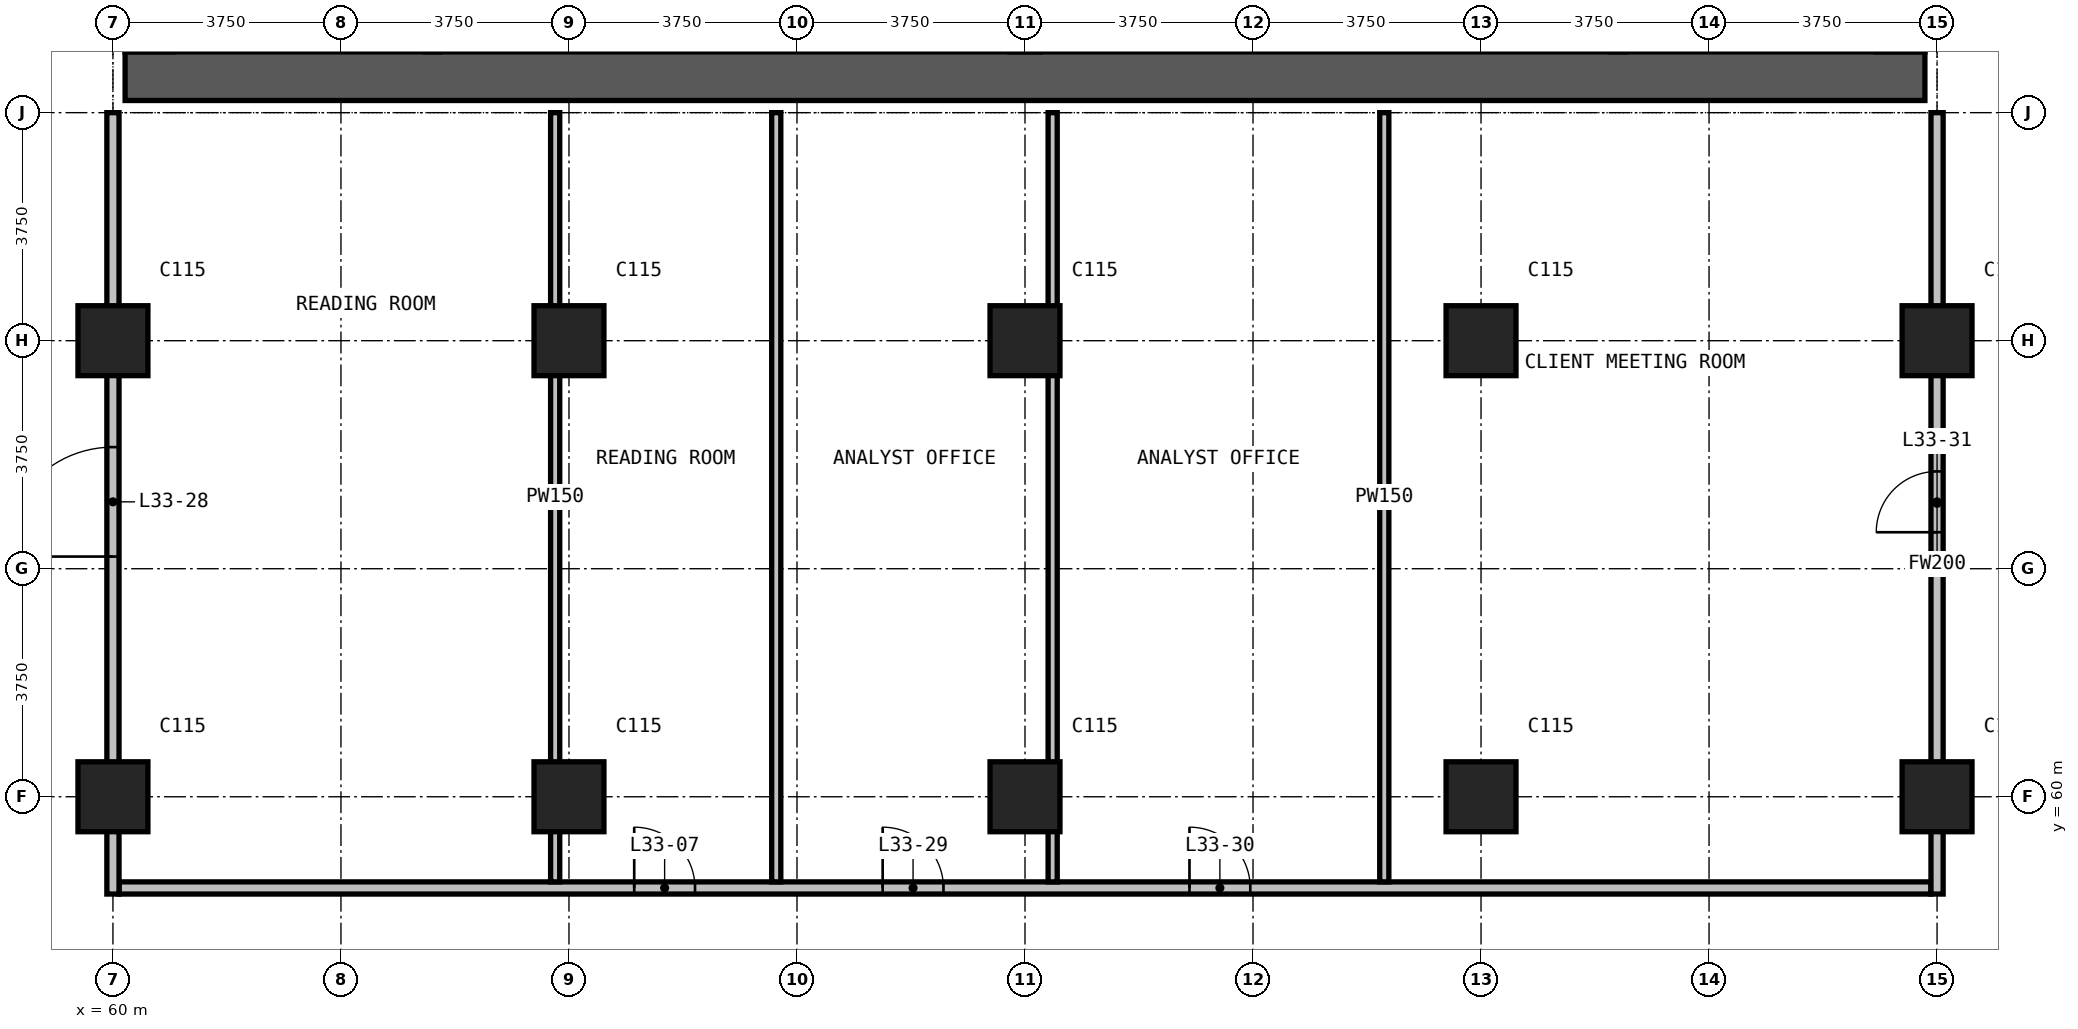
"""IFC4 building model, lengths in metres.
Left out: names, types, materials, properties, quantities, classifications, styles, units other than length and angle.
Written with IfcOpenShell. Run it as: python <this file> out.ifc"""

import sys

from ifc_helpers import new_model, si_unit, direction, frame, frame_2d, origin, origin_2d, place, context, subcontext, project, spatial, rectangle, extrude, element, fill, save


model = new_model("IFC4")
c1 = context("Model", 3, precision=1e-05, world=origin(), true_north=direction((0.0, 1.0)))
c2 = subcontext(c1, "Body", "Model", "MODEL_VIEW")
j1 = project(units=[si_unit("LENGTHUNIT", "METRE"), si_unit("PLANEANGLEUNIT", "RADIAN")], contexts=[c1])
p1 = place(None, origin())
s1 = spatial("IfcSite", under=j1, at=p1, CompositionType="ELEMENT")
p2 = place(p1, origin())
s2 = spatial("IfcBuilding", under=s1, at=p2, CompositionType="ELEMENT")
p3 = place(p2, frame((0.0, 0.0, 132.4)))
s3 = spatial("IfcBuildingStorey", under=s2, at=p3, CompositionType="ELEMENT", Elevation=132.4)
for number, where, z_axis, x_axis in (
    (1, (60.0, 60.0, 0.0), (0.0, 0.0, 1.0), (1.0, 0.0, 0.0)),
    (2, (60.0, 67.5, 0.0), (0.0, 0.0, 1.0), (1.0, 0.0, 0.0)),
    (3, (67.5, 60.0, 0.0), (0.0, 0.0, 1.0), (1.0, 0.0, 0.0)),
    (4, (67.5, 67.5, 0.0), (0.0, 0.0, 1.0), (1.0, 0.0, 0.0)),
    (5, (75.0, 60.0, 0.0), (0.0, 0.0, 1.0), (1.0, 0.0, 0.0)),
    (6, (75.0, 67.5, 0.0), (0.0, 0.0, 1.0), (1.0, 0.0, 0.0)),
    (7, (82.5, 60.0, 0.0), (0.0, 0.0, 1.0), (1.0, 0.0, 0.0)),
    (8, (82.5, 67.5, 0.0), (0.0, 0.0, 1.0), (1.0, 0.0, 0.0)),
    (9, (90.0, 60.0, 0.0), (0.0, 0.0, 1.0), (1.0, 0.0, 0.0)),
    (10, (90.0, 67.5, 0.0), (0.0, 0.0, 1.0), (1.0, 0.0, 0.0)),
):
    element("IfcColumn", number, at=place(p3, frame(where, z_axis=z_axis, x_axis=x_axis)), inside=s3, PredefinedType="COLUMN", context=c2, shape_type="SweptSolid", body=[
        extrude(rectangle(XDim=1.15, YDim=1.15, at=origin_2d()), origin(), (0.0, 0.0, 1.0), 3.6),
    ])
p4 = place(p3, frame((60.2, 71.85, 0.0), z_axis=(0.0, 0.0, 1.0), x_axis=(1.0, 0.0, 0.0)))
e11 = element("IfcWall", 11, at=p4, inside=s3, PredefinedType="SHEAR", context=c2, shape_type="SweptSolid", body=[
    extrude(rectangle(XDim=29.6, YDim=0.8, at=frame_2d((14.8, 0.0))), origin(), (0.0, 0.0, 1.0), 3.6),
])
p5 = place(p3, frame((60.1, 58.5, 0.0), z_axis=(0.0, 0.0, 1.0), x_axis=(1.0, 0.0, 0.0)))
e12 = element("IfcWall", 12, at=p5, inside=s3, PredefinedType="PARTITIONING", context=c2, shape_type="SweptSolid", body=[
    extrude(rectangle(XDim=29.8, YDim=0.2, at=frame_2d((14.9, 0.0))), origin(), (0.0, 0.0, 1.0), 3.3),
])
p6 = place(p5, frame((8.473, 0.0, 0.0)))
e13 = element("IfcOpeningElement", 13, at=p6, cuts=e12, PredefinedType="OPENING", context=c2, shape_type="SweptSolid", body=[
    extrude(rectangle(XDim=1.0, YDim=2.2, at=frame_2d((0.5, 1.1))), frame((0.0, 0.11, 0.0), z_axis=(0.0, -1.0, 0.0), x_axis=(1.0, 0.0, 0.0)), (0.0, 0.0, 1.0), 0.22),
])
p7 = place(p5, frame((12.559, 0.0, 0.0)))
e14 = element("IfcOpeningElement", 14, at=p7, cuts=e12, PredefinedType="OPENING", context=c2, shape_type="SweptSolid", body=[
    extrude(rectangle(XDim=1.0, YDim=2.2, at=frame_2d((0.5, 1.1))), frame((0.0, 0.11, 0.0), z_axis=(0.0, -1.0, 0.0), x_axis=(1.0, 0.0, 0.0)), (0.0, 0.0, 1.0), 0.22),
])
p8 = place(p5, frame((17.605, 0.0, 0.0)))
e15 = element("IfcOpeningElement", 15, at=p8, cuts=e12, PredefinedType="OPENING", context=c2, shape_type="SweptSolid", body=[
    extrude(rectangle(XDim=1.0, YDim=2.2, at=frame_2d((0.5, 1.1))), frame((0.0, 0.11, 0.0), z_axis=(0.0, -1.0, 0.0), x_axis=(1.0, 0.0, 0.0)), (0.0, 0.0, 1.0), 0.22),
])
p9 = place(p3, frame((60.0, 58.4, 0.0), z_axis=(0.0, 0.0, 1.0), x_axis=(0.0, 1.0, 0.0)))
e16 = element("IfcWall", 16, at=p9, inside=s3, PredefinedType="PARTITIONING", context=c2, shape_type="SweptSolid", body=[
    extrude(rectangle(XDim=12.85, YDim=0.2, at=frame_2d((6.425, 0.0))), origin(), (0.0, 0.0, 1.0), 3.3),
])
p10 = place(p9, frame((5.55, 0.0, 0.0)))
e17 = element("IfcOpeningElement", 17, at=p10, cuts=e16, PredefinedType="OPENING", context=c2, shape_type="SweptSolid", body=[
    extrude(rectangle(XDim=1.8, YDim=2.2, at=frame_2d((0.9, 1.1))), frame((0.0, 0.11, 0.0), z_axis=(0.0, -1.0, 0.0), x_axis=(1.0, 0.0, 0.0)), (0.0, 0.0, 1.0), 0.22),
])
p11 = place(p3, frame((90.0, 58.4, 0.0), z_axis=(0.0, 0.0, 1.0), x_axis=(0.0, 1.0, 0.0)))
e18 = element("IfcWall", 18, at=p11, inside=s3, PredefinedType="PARTITIONING", context=c2, shape_type="SweptSolid", body=[
    extrude(rectangle(XDim=12.85, YDim=0.2, at=frame_2d((6.425, 0.0))), origin(), (0.0, 0.0, 1.0), 3.3),
])
p12 = place(p11, frame((5.95, 0.0, 0.0)))
e19 = element("IfcOpeningElement", 19, at=p12, cuts=e18, PredefinedType="OPENING", context=c2, shape_type="SweptSolid", body=[
    extrude(rectangle(XDim=1.0, YDim=2.2, at=frame_2d((0.5, 1.1))), frame((0.0, 0.11, 0.0), z_axis=(0.0, -1.0, 0.0), x_axis=(1.0, 0.0, 0.0)), (0.0, 0.0, 1.0), 0.22),
])
for number, where, z_axis, x_axis in (
    (20, (67.273, 58.6, 0.0), (0.0, 0.0, 1.0), (0.0, 1.0, 0.0)),
    (21, (70.909, 58.6, 0.0), (0.0, 0.0, 1.0), (0.0, 1.0, 0.0)),
    (22, (75.455, 58.6, 0.0), (0.0, 0.0, 1.0), (0.0, 1.0, 0.0)),
    (23, (80.909, 58.6, 0.0), (0.0, 0.0, 1.0), (0.0, 1.0, 0.0)),
):
    element("IfcWall", number, at=place(p3, frame(where, z_axis=z_axis, x_axis=x_axis)), inside=s3, PredefinedType="PARTITIONING", context=c2, shape_type="SweptSolid", body=[
        extrude(rectangle(XDim=12.65, YDim=0.15, at=frame_2d((6.325, 0.0))), origin(), (0.0, 0.0, 1.0), 3.3),
    ])
p13 = place(p6, origin())
e24 = element("IfcDoor", 24, at=p13, inside=s3, OperationType="SINGLE_SWING_RIGHT", PredefinedType="DOOR", context=c2, shape_type="SweptSolid", body=[
    extrude(rectangle(XDim=1.0, YDim=2.2, at=frame_2d((0.5, 1.1))), frame((0.0, 0.025, 0.0), z_axis=(0.0, -1.0, 0.0), x_axis=(1.0, 0.0, 0.0)), (0.0, 0.0, 1.0), 0.05),
])
fill(e13, e24)
p14 = place(p10, origin())
e25 = element("IfcDoor", 25, at=p14, inside=s3, OperationType="DOUBLE_DOOR_SINGLE_SWING", PredefinedType="DOOR", context=c2, shape_type="SweptSolid", body=[
    extrude(rectangle(XDim=1.8, YDim=2.2, at=frame_2d((0.9, 1.1))), frame((0.0, 0.025, 0.0), z_axis=(0.0, -1.0, 0.0), x_axis=(1.0, 0.0, 0.0)), (0.0, 0.0, 1.0), 0.05),
])
fill(e17, e25)
p15 = place(p7, origin())
e26 = element("IfcDoor", 26, at=p15, inside=s3, OperationType="SINGLE_SWING_RIGHT", PredefinedType="DOOR", context=c2, shape_type="SweptSolid", body=[
    extrude(rectangle(XDim=1.0, YDim=2.2, at=frame_2d((0.5, 1.1))), frame((0.0, 0.025, 0.0), z_axis=(0.0, -1.0, 0.0), x_axis=(1.0, 0.0, 0.0)), (0.0, 0.0, 1.0), 0.05),
])
fill(e14, e26)
p16 = place(p8, origin())
e27 = element("IfcDoor", 27, at=p16, inside=s3, OperationType="SINGLE_SWING_LEFT", PredefinedType="DOOR", context=c2, shape_type="SweptSolid", body=[
    extrude(rectangle(XDim=1.0, YDim=2.2, at=frame_2d((0.5, 1.1))), frame((0.0, 0.025, 0.0), z_axis=(0.0, -1.0, 0.0), x_axis=(1.0, 0.0, 0.0)), (0.0, 0.0, 1.0), 0.05),
])
fill(e15, e27)
p17 = place(p12, origin())
e28 = element("IfcDoor", 28, at=p17, inside=s3, OperationType="SINGLE_SWING_RIGHT", PredefinedType="DOOR", context=c2, shape_type="SweptSolid", body=[
    extrude(rectangle(XDim=1.0, YDim=2.2, at=frame_2d((0.5, 1.1))), frame((0.0, 0.025, 0.0), z_axis=(0.0, -1.0, 0.0), x_axis=(1.0, 0.0, 0.0)), (0.0, 0.0, 1.0), 0.05),
])
fill(e19, e28)
save(model, sys.argv[1])
